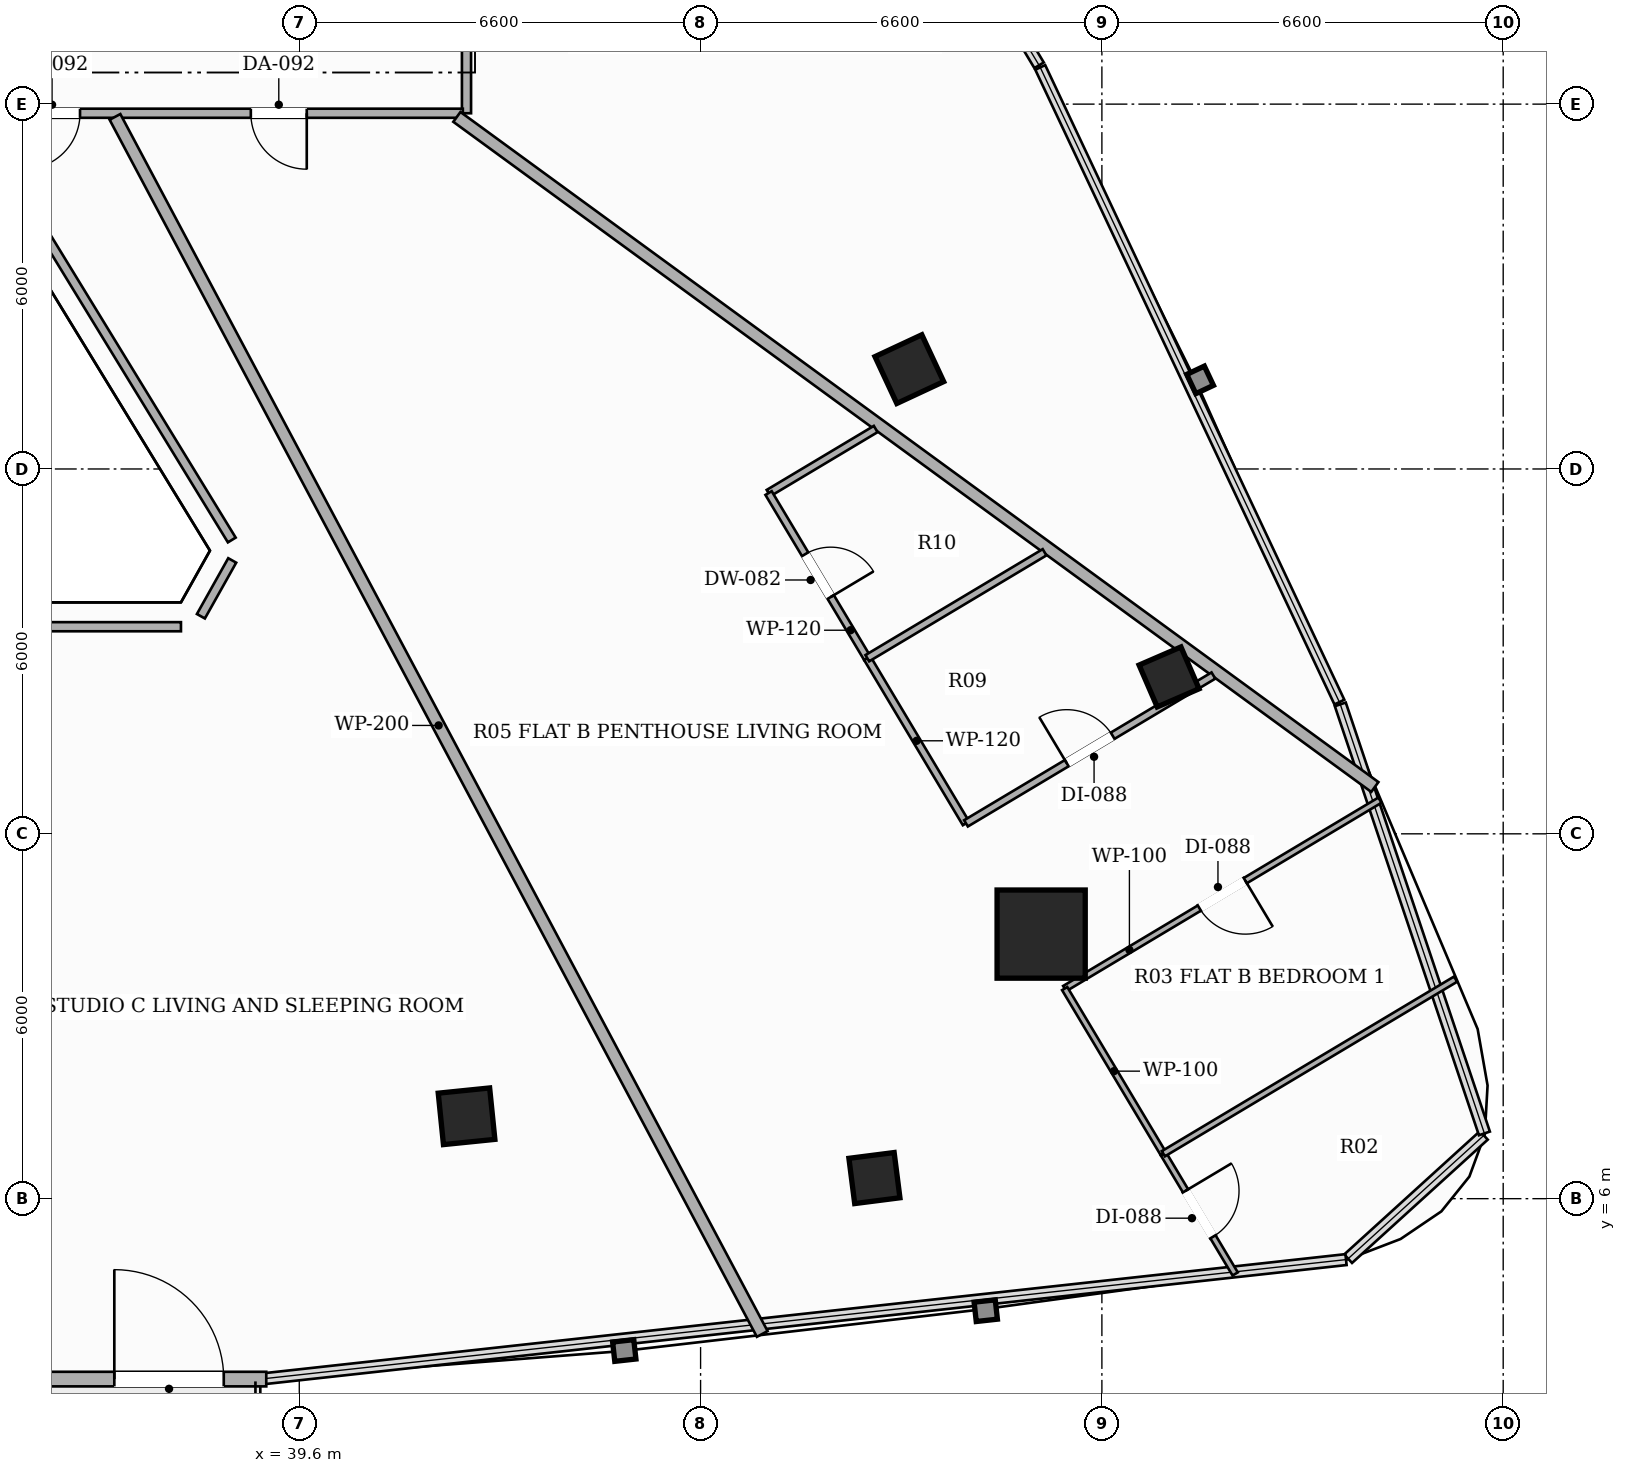
"""IFC4 building model, lengths in metres.
Left out: names, types, materials, properties, quantities, classifications, styles, units other than length and angle.
Written with IfcOpenShell. Run it as: python <this file> out.ifc"""

import sys

from ifc_helpers import new_model, si_unit, direction, frame, frame_2d, origin, origin_2d, place, context, subcontext, project, spatial, rectangle, hollow_rectangle, extrude, element, fill, save


model = new_model("IFC4")
c1 = context("Model", 3, precision=1e-05, world=origin(), true_north=direction((0.0, 1.0)))
c2 = subcontext(c1, "Body", "Model", "MODEL_VIEW")
j1 = project(units=[si_unit("LENGTHUNIT", "METRE"), si_unit("PLANEANGLEUNIT", "RADIAN")], contexts=[c1])
p1 = place(None, origin())
s1 = spatial("IfcSite", under=j1, at=p1, CompositionType="ELEMENT")
p2 = place(p1, origin())
s2 = spatial("IfcBuilding", under=s1, at=p2, CompositionType="ELEMENT")
p3 = place(p2, frame((0.0, 0.0, 119.9)))
s3 = spatial("IfcBuildingStorey", under=s2, at=p3, CompositionType="ELEMENT", Elevation=119.9)
p4 = place(p3, frame((51.801, 10.351, 0.0), z_axis=(0.0, 0.0, 1.0), x_axis=(1.0, 0.0, 0.0)))
e1 = element("IfcColumn", 1, at=p4, inside=s3, PredefinedType="COLUMN", context=c2, shape_type="SweptSolid", body=[
    extrude(hollow_rectangle(XDim=1.45, YDim=1.45, WallThickness=0.045, at=origin_2d()), origin(), (0.0, 0.0, 1.0), 3.3),
])
for number, where, z_axis, x_axis in (
    (2, (42.351, 7.355, 0.0), (0.0, 0.0, 1.0), (0.995, 0.101, 0.0)),
    (3, (49.633, 19.642, 0.0), (0.0, 0.0, 1.0), (-0.423, 0.906, 0.0)),
):
    element("IfcColumn", number, at=place(p3, frame(where, z_axis=z_axis, x_axis=x_axis)), inside=s3, PredefinedType="COLUMN", context=c2, shape_type="SweptSolid", body=[
        extrude(hollow_rectangle(XDim=0.85, YDim=0.85, WallThickness=0.028, at=origin_2d()), origin(), (0.0, 0.0, 1.0), 3.3),
    ])
for number, where, z_axis, x_axis in (
    (4, (49.059, 6.339, 0.0), (0.0, 0.0, 1.0), (0.992, 0.127, 0.0)),
    (5, (53.905, 14.58, 0.0), (0.0, 0.0, 1.0), (-0.397, 0.918, 0.0)),
):
    element("IfcColumn", number, at=place(p3, frame(where, z_axis=z_axis, x_axis=x_axis)), inside=s3, PredefinedType="COLUMN", context=c2, shape_type="SweptSolid", body=[
        extrude(hollow_rectangle(XDim=0.75, YDim=0.75, WallThickness=0.025, at=origin_2d()), origin(), (0.0, 0.0, 1.0), 3.3),
    ])
p5 = place(p3, frame((26.943, 3.033, 0.0), z_axis=(0.0, 0.0, 1.0), x_axis=(1.0, 0.0, 0.0)))
e6 = element("IfcWall", 6, at=p5, inside=s3, PredefinedType="SOLIDWALL", context=c2, shape_type="SweptSolid", body=[
    extrude(rectangle(XDim=12.114, YDim=0.24, at=frame_2d((6.057, 0.0))), origin(), (0.0, 0.0, 1.0), 2.624),
])
p6 = place(p5, frame((9.615, 0.0, 0.0)))
e7 = element("IfcOpeningElement", 7, at=p6, cuts=e6, PredefinedType="OPENING", context=c2, shape_type="SweptSolid", body=[
    extrude(rectangle(XDim=1.8, YDim=2.2, at=frame_2d((0.9, 1.1))), frame((0.0, 0.13, 0.0), z_axis=(0.0, -1.0, 0.0), x_axis=(1.0, 0.0, 0.0)), (0.0, 0.0, 1.0), 0.26),
])
p7 = place(p3, frame((42.35, 28.34, 0.0), z_axis=(0.0, 0.0, 1.0), x_axis=(0.0, -1.0, 0.0)))
e8 = element("IfcWall", 8, at=p7, inside=s3, PredefinedType="PARTITIONING", context=c2, shape_type="SweptSolid", body=[
    extrude(rectangle(XDim=4.49, YDim=0.15, at=frame_2d((2.245, 0.0))), origin(), (0.0, 0.0, 1.0), 2.721),
])
p8 = place(p7, frame((1.805, 0.0, 0.0)))
e9 = element("IfcOpeningElement", 9, at=p8, cuts=e8, PredefinedType="OPENING", context=c2, shape_type="SweptSolid", body=[
    extrude(rectangle(XDim=0.88, YDim=2.1, at=frame_2d((0.44, 1.05))), frame((0.0, 0.085, 0.0), z_axis=(0.0, -1.0, 0.0), x_axis=(1.0, 0.0, 0.0)), (0.0, 0.0, 1.0), 0.17),
])
p9 = place(p3, frame((42.29, 23.85, 0.0), z_axis=(0.0, 0.0, 1.0), x_axis=(-1.0, 0.0, 0.0)))
e10 = element("IfcWall", 10, at=p9, inside=s3, PredefinedType="PARTITIONING", context=c2, shape_type="SweptSolid", body=[
    extrude(rectangle(XDim=8.088, YDim=0.15, at=frame_2d((4.044, 0.0))), origin(), (0.0, 0.0, 1.0), 2.492),
])
p10 = place(p9, frame((2.567, 0.0, 0.0)))
e11 = element("IfcOpeningElement", 11, at=p10, cuts=e10, PredefinedType="OPENING", context=c2, shape_type="SweptSolid", body=[
    extrude(rectangle(XDim=0.92, YDim=2.15, at=frame_2d((0.46, 1.075))), frame((0.0, 0.085, 0.0), z_axis=(0.0, -1.0, 0.0), x_axis=(1.0, 0.0, 0.0)), (0.0, 0.0, 1.0), 0.17),
])
p11 = place(p9, frame((6.296, 0.0, 0.0)))
e12 = element("IfcOpeningElement", 12, at=p11, cuts=e10, PredefinedType="OPENING", context=c2, shape_type="SweptSolid", body=[
    extrude(rectangle(XDim=0.92, YDim=2.15, at=frame_2d((0.46, 1.075))), frame((0.0, 0.085, 0.0), z_axis=(0.0, -1.0, 0.0), x_axis=(1.0, 0.0, 0.0)), (0.0, 0.0, 1.0), 0.17),
])
p12 = place(p3, frame((34.233, 23.79, 0.0), z_axis=(0.0, 0.0, 1.0), x_axis=(0.521893040745, -0.853010934292, 0.0)))
e13 = element("IfcWall", 13, at=p12, inside=s3, PredefinedType="PARTITIONING", context=c2, shape_type="SweptSolid", body=[
    extrude(rectangle(XDim=8.157, YDim=0.15, at=frame_2d((4.079, 0.0))), origin(), (0.0, 0.0, 1.0), 2.721),
])
p13 = place(p3, frame((38.497, 16.496, 0.0), z_axis=(0.0, 0.0, 1.0), x_axis=(-0.489281087794, -0.872126147485, 0.0)))
e14 = element("IfcWall", 14, at=p13, inside=s3, PredefinedType="PARTITIONING", context=c2, shape_type="SweptSolid", body=[
    extrude(rectangle(XDim=1.053, YDim=0.15, at=frame_2d((0.526, 0.0))), origin(), (0.0, 0.0, 1.0), 3.06),
])
p14 = place(p3, frame((37.654, 15.406, 0.0), z_axis=(0.0, 0.0, 1.0), x_axis=(-1.0, 0.0, 0.0)))
e15 = element("IfcWall", 15, at=p14, inside=s3, PredefinedType="PARTITIONING", context=c2, shape_type="SweptSolid", body=[
    extrude(rectangle(XDim=9.308, YDim=0.15, at=frame_2d((4.654, 0.0))), origin(), (0.0, 0.0, 1.0), 2.721),
])
p15 = place(p3, frame((47.214, 3.775, 0.0), z_axis=(0.0, 0.0, 1.0), x_axis=(-0.469567249912, 0.88289670846, 0.0)))
e16 = element("IfcWall", 16, at=p15, inside=s3, PredefinedType="PARTITIONING", context=c2, shape_type="SweptSolid", body=[
    extrude(rectangle(XDim=22.67, YDim=0.2, at=frame_2d((11.335, 0.0))), origin(), (0.0, 0.0, 1.0), 2.413),
])
p16 = place(p3, frame((42.192, 23.79, 0.0), z_axis=(0.0, 0.0, 1.0), x_axis=(0.807710254014, -0.589579634621, 0.0)))
e17 = element("IfcWall", 17, at=p16, inside=s3, PredefinedType="PARTITIONING", context=c2, shape_type="SweptSolid", body=[
    extrude(rectangle(XDim=18.691, YDim=0.2, at=frame_2d((9.346, 0.0))), origin(), (0.0, 0.0, 1.0), 2.413),
])
p17 = place(p3, frame((49.08, 18.657, 0.0), z_axis=(0.0, 0.0, 1.0), x_axis=(-0.858394155401, -0.51299071529, 0.0)))
e18 = element("IfcWall", 18, at=p17, inside=s3, PredefinedType="PARTITIONING", context=c2, shape_type="SweptSolid", body=[
    extrude(rectangle(XDim=2.053, YDim=0.12, at=frame_2d((1.026, 0.0))), origin(), (0.0, 0.0, 1.0), 2.721),
])
p18 = place(p3, frame((47.318, 17.604, 0.0), z_axis=(0.0, 0.0, 1.0), x_axis=(0.51313361254, -0.858308741469, 0.0)))
e19 = element("IfcWall", 19, at=p18, inside=s3, PredefinedType="PARTITIONING", context=c2, shape_type="SweptSolid", body=[
    extrude(rectangle(XDim=3.165, YDim=0.12, at=frame_2d((1.582, 0.0))), origin(), (0.0, 0.0, 1.0), 2.492),
])
p19 = place(p18, frame((1.172, 0.0, 0.0)))
e20 = element("IfcOpeningElement", 20, at=p19, cuts=e19, PredefinedType="OPENING", context=c2, shape_type="SweptSolid", body=[
    extrude(rectangle(XDim=0.82, YDim=2.1, at=frame_2d((0.41, 1.05))), frame((0.0, 0.07, 0.0), z_axis=(0.0, -1.0, 0.0), x_axis=(1.0, 0.0, 0.0)), (0.0, 0.0, 1.0), 0.14),
])
p20 = place(p3, frame((48.942, 14.888, 0.0), z_axis=(0.0, 0.0, 1.0), x_axis=(0.512997049548, -0.858390369911, 0.0)))
e21 = element("IfcWall", 21, at=p20, inside=s3, PredefinedType="PARTITIONING", context=c2, shape_type="SweptSolid", body=[
    extrude(rectangle(XDim=3.164, YDim=0.12, at=frame_2d((1.582, 0.0))), origin(), (0.0, 0.0, 1.0), 2.492),
])
p21 = place(p3, frame((50.565, 12.172, 0.0), z_axis=(0.0, 0.0, 1.0), x_axis=(0.858473034369, 0.512858703018, 0.0)))
e22 = element("IfcWall", 22, at=p21, inside=s3, PredefinedType="PARTITIONING", context=c2, shape_type="SweptSolid", body=[
    extrude(rectangle(XDim=4.74, YDim=0.12, at=frame_2d((2.37, 0.0))), origin(), (0.0, 0.0, 1.0), 2.413),
])
p22 = place(p21, frame((1.93, 0.0, 0.0)))
e23 = element("IfcOpeningElement", 23, at=p22, cuts=e22, PredefinedType="OPENING", context=c2, shape_type="SweptSolid", body=[
    extrude(rectangle(XDim=0.88, YDim=2.1, at=frame_2d((0.44, 1.05))), frame((0.0, 0.07, 0.0), z_axis=(0.0, -1.0, 0.0), x_axis=(1.0, 0.0, 0.0)), (0.0, 0.0, 1.0), 0.14),
])
p23 = place(p3, frame((57.373, 12.554, 0.0), z_axis=(0.0, 0.0, 1.0), x_axis=(-0.858379637305, -0.513015007831, 0.0)))
e24 = element("IfcWall", 24, at=p23, inside=s3, PredefinedType="PARTITIONING", context=c2, shape_type="SweptSolid", body=[
    extrude(rectangle(XDim=6.041, YDim=0.1, at=frame_2d((3.02, 0.0))), origin(), (0.0, 0.0, 1.0), 2.619),
])
p24 = place(p23, frame((2.58, 0.0, 0.0)))
e25 = element("IfcOpeningElement", 25, at=p24, cuts=e24, PredefinedType="OPENING", context=c2, shape_type="SweptSolid", body=[
    extrude(rectangle(XDim=0.88, YDim=2.1, at=frame_2d((0.44, 1.05))), frame((0.0, 0.06, 0.0), z_axis=(0.0, -1.0, 0.0), x_axis=(1.0, 0.0, 0.0)), (0.0, 0.0, 1.0), 0.12),
])
p25 = place(p3, frame((52.188, 9.455, 0.0), z_axis=(0.0, 0.0, 1.0), x_axis=(0.512963071382, -0.858410675259, 0.0)))
e26 = element("IfcWall", 26, at=p25, inside=s3, PredefinedType="PARTITIONING", context=c2, shape_type="SweptSolid", body=[
    extrude(rectangle(XDim=3.164, YDim=0.1, at=frame_2d((1.582, 0.0))), origin(), (0.0, 0.0, 1.0), 2.619),
])
p26 = place(p3, frame((53.811, 6.739, 0.0), z_axis=(0.0, 0.0, 1.0), x_axis=(0.512795384263, -0.858510858335, 0.0)))
e27 = element("IfcWall", 27, at=p26, inside=s3, PredefinedType="PARTITIONING", context=c2, shape_type="SweptSolid", body=[
    extrude(rectangle(XDim=2.303, YDim=0.1, at=frame_2d((1.151, 0.0))), origin(), (0.0, 0.0, 1.0), 3.06),
])
p27 = place(p26, frame((0.711, 0.0, 0.0)))
e28 = element("IfcOpeningElement", 28, at=p27, cuts=e27, PredefinedType="OPENING", context=c2, shape_type="SweptSolid", body=[
    extrude(rectangle(XDim=0.88, YDim=2.1, at=frame_2d((0.44, 1.05))), frame((0.0, 0.06, 0.0), z_axis=(0.0, -1.0, 0.0), x_axis=(1.0, 0.0, 0.0)), (0.0, 0.0, 1.0), 0.12),
])
p28 = place(p3, frame((51.857, 16.63, 0.0), z_axis=(0.0, 0.0, 1.0), x_axis=(-0.858411372428, -0.512961904713, 0.0)))
e29 = element("IfcWall", 29, at=p28, inside=s3, PredefinedType="PARTITIONING", context=c2, shape_type="SweptSolid", body=[
    extrude(rectangle(XDim=3.396, YDim=0.12, at=frame_2d((1.698, 0.0))), origin(), (0.0, 0.0, 1.0), 2.413),
])
p29 = place(p3, frame((58.617, 9.61, 0.0), z_axis=(0.0, 0.0, 1.0), x_axis=(-0.858472602363, -0.512859426151, 0.0)))
e30 = element("IfcWall", 30, at=p29, inside=s3, PredefinedType="PARTITIONING", context=c2, shape_type="SweptSolid", body=[
    extrude(rectangle(XDim=5.598, YDim=0.1, at=frame_2d((2.799, 0.0))), origin(), (0.0, 0.0, 1.0), 3.06),
])
p30 = place(p6, origin())
e31 = element("IfcDoor", 31, at=p30, inside=s3, OperationType="SINGLE_SWING_LEFT", PredefinedType="DOOR", context=c2, shape_type="SweptSolid", body=[
    extrude(rectangle(XDim=1.8, YDim=2.2, at=frame_2d((0.9, 1.1))), frame((0.0, 0.025, 0.0), z_axis=(0.0, -1.0, 0.0), x_axis=(1.0, 0.0, 0.0)), (0.0, 0.0, 1.0), 0.05),
])
fill(e7, e31)
p31 = place(p10, origin())
e32 = element("IfcDoor", 32, at=p31, inside=s3, OperationType="SINGLE_SWING_LEFT", PredefinedType="DOOR", context=c2, shape_type="SweptSolid", body=[
    extrude(rectangle(XDim=0.92, YDim=2.15, at=frame_2d((0.46, 1.075))), frame((0.0, 0.025, 0.0), z_axis=(0.0, -1.0, 0.0), x_axis=(1.0, 0.0, 0.0)), (0.0, 0.0, 1.0), 0.05),
])
fill(e11, e32)
p32 = place(p19, origin())
e33 = element("IfcDoor", 33, at=p32, inside=s3, OperationType="SINGLE_SWING_RIGHT", PredefinedType="DOOR", context=c2, shape_type="SweptSolid", body=[
    extrude(rectangle(XDim=0.82, YDim=2.1, at=frame_2d((0.41, 1.05))), frame((0.0, 0.025, 0.0), z_axis=(0.0, -1.0, 0.0), x_axis=(1.0, 0.0, 0.0)), (0.0, 0.0, 1.0), 0.05),
])
fill(e20, e33)
p33 = place(p22, origin())
e34 = element("IfcDoor", 34, at=p33, inside=s3, OperationType="SINGLE_SWING_LEFT", PredefinedType="DOOR", context=c2, shape_type="SweptSolid", body=[
    extrude(rectangle(XDim=0.88, YDim=2.1, at=frame_2d((0.44, 1.05))), frame((0.0, 0.025, 0.0), z_axis=(0.0, -1.0, 0.0), x_axis=(1.0, 0.0, 0.0)), (0.0, 0.0, 1.0), 0.05),
])
fill(e23, e34)
p34 = place(p24, origin())
e35 = element("IfcDoor", 35, at=p34, inside=s3, OperationType="SINGLE_SWING_LEFT", PredefinedType="DOOR", context=c2, shape_type="SweptSolid", body=[
    extrude(rectangle(XDim=0.88, YDim=2.1, at=frame_2d((0.44, 1.05))), frame((0.0, 0.025, 0.0), z_axis=(0.0, -1.0, 0.0), x_axis=(1.0, 0.0, 0.0)), (0.0, 0.0, 1.0), 0.05),
])
fill(e25, e35)
p35 = place(p27, origin())
e36 = element("IfcDoor", 36, at=p35, inside=s3, OperationType="SINGLE_SWING_LEFT", PredefinedType="DOOR", context=c2, shape_type="SweptSolid", body=[
    extrude(rectangle(XDim=0.88, YDim=2.1, at=frame_2d((0.44, 1.05))), frame((0.0, 0.025, 0.0), z_axis=(0.0, -1.0, 0.0), x_axis=(1.0, 0.0, 0.0)), (0.0, 0.0, 1.0), 0.05),
])
fill(e28, e36)
p36 = place(p11, origin())
e37 = element("IfcDoor", 37, at=p36, inside=s3, OperationType="SINGLE_SWING_RIGHT", PredefinedType="DOOR", context=c2, shape_type="SweptSolid", body=[
    extrude(rectangle(XDim=0.92, YDim=2.15, at=frame_2d((0.46, 1.075))), frame((0.0, 0.025, 0.0), z_axis=(0.0, -1.0, 0.0), x_axis=(1.0, 0.0, 0.0)), (0.0, 0.0, 1.0), 0.05),
])
fill(e12, e37)
save(model, sys.argv[1])
